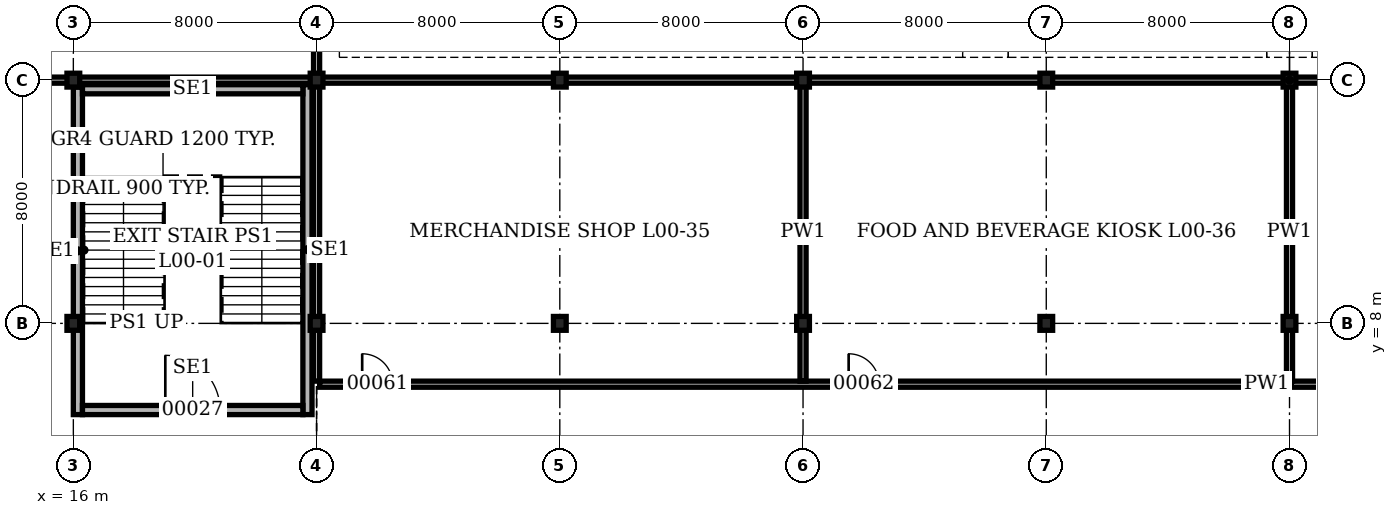
"""IFC4 building model, lengths in metres.
Left out: names, types, materials, properties, quantities, classifications, styles, units other than length and angle.
Written with IfcOpenShell. Run it as: python <this file> out.ifc"""

import sys

from ifc_helpers import new_model, si_unit, direction, frame, frame_2d, origin, origin_2d, place, context, subcontext, project, spatial, rectangle, i_section, extrude, element, fill, save


model = new_model("IFC4")
c1 = context("Model", 3, precision=1e-05, world=origin(), true_north=direction((0.0, 1.0)))
c2 = subcontext(c1, "Body", "Model", "MODEL_VIEW")
j1 = project(units=[si_unit("LENGTHUNIT", "METRE"), si_unit("PLANEANGLEUNIT", "RADIAN")], contexts=[c1])
p1 = place(None, origin())
s1 = spatial("IfcSite", under=j1, at=p1, CompositionType="ELEMENT")
p2 = place(p1, origin())
s2 = spatial("IfcBuilding", under=s1, at=p2, CompositionType="ELEMENT")
p3 = place(p2, origin())
s3 = spatial("IfcBuildingStorey", under=s2, at=p3, CompositionType="ELEMENT", Elevation=0.0)
for number, where, z_axis, x_axis in (
    (1, (16.0, 8.0, 0.0), (0.0, 0.0, 1.0), (1.0, 0.0, 0.0)),
    (2, (16.0, 16.0, 0.0), (0.0, 0.0, 1.0), (1.0, 0.0, 0.0)),
    (3, (24.0, 8.0, 0.0), (0.0, 0.0, 1.0), (1.0, 0.0, 0.0)),
    (4, (24.0, 16.0, 0.0), (0.0, 0.0, 1.0), (1.0, 0.0, 0.0)),
    (5, (32.0, 8.0, 0.0), (0.0, 0.0, 1.0), (1.0, 0.0, 0.0)),
    (6, (32.0, 16.0, 0.0), (0.0, 0.0, 1.0), (1.0, 0.0, 0.0)),
    (7, (40.0, 8.0, 0.0), (0.0, 0.0, 1.0), (1.0, 0.0, 0.0)),
    (8, (40.0, 16.0, 0.0), (0.0, 0.0, 1.0), (1.0, 0.0, 0.0)),
    (9, (48.0, 8.0, 0.0), (0.0, 0.0, 1.0), (1.0, 0.0, 0.0)),
    (10, (48.0, 16.0, 0.0), (0.0, 0.0, 1.0), (1.0, 0.0, 0.0)),
    (11, (56.0, 8.0, 0.0), (0.0, 0.0, 1.0), (1.0, 0.0, 0.0)),
    (12, (56.0, 16.0, 0.0), (0.0, 0.0, 1.0), (1.0, 0.0, 0.0)),
):
    element("IfcColumn", number, at=place(p3, frame(where, z_axis=z_axis, x_axis=x_axis)), inside=s3, PredefinedType="COLUMN", context=c2, shape_type="SweptSolid", body=[
        extrude(i_section(OverallWidth=0.419, OverallDepth=0.455, WebThickness=0.042, FlangeThickness=0.068, at=origin_2d()), origin(), (0.0, 0.0, 1.0), 4.9),
    ])
p4 = place(p3, frame((16.15, 5.0, 0.0), z_axis=(0.0, 0.0, 1.0), x_axis=(0.0, 1.0, 0.0)))
e13 = element("IfcWall", 13, at=p4, inside=s3, PredefinedType="SOLIDWALL", context=c2, shape_type="SweptSolid", body=[
    extrude(rectangle(XDim=10.773, YDim=0.3, at=frame_2d((5.386, 0.0))), origin(), (0.0, 0.0, 1.0), 4.7),
])
p5 = place(p3, frame((23.7, 5.0, 0.0), z_axis=(0.0, 0.0, 1.0), x_axis=(0.0, 1.0, 0.0)))
e14 = element("IfcWall", 14, at=p5, inside=s3, PredefinedType="SOLIDWALL", context=c2, shape_type="SweptSolid", body=[
    extrude(rectangle(XDim=10.85, YDim=0.3, at=frame_2d((5.425, 0.0))), origin(), (0.0, 0.0, 1.0), 4.7),
])
p6 = place(p3, frame((16.3, 5.15, 0.0), z_axis=(0.0, 0.0, 1.0), x_axis=(1.0, 0.0, 0.0)))
e15 = element("IfcWall", 15, at=p6, inside=s3, PredefinedType="SOLIDWALL", context=c2, shape_type="SweptSolid", body=[
    extrude(rectangle(XDim=7.25, YDim=0.3, at=frame_2d((3.625, 0.0))), origin(), (0.0, 0.0, 1.0), 4.7),
])
p7 = place(p6, frame((2.725, 0.0, 0.0)))
e16 = element("IfcOpeningElement", 16, at=p7, cuts=e15, PredefinedType="OPENING", context=c2, shape_type="SweptSolid", body=[
    extrude(rectangle(XDim=1.8, YDim=2.1, at=frame_2d((0.9, 1.05))), frame((0.0, 0.16, 0.0), z_axis=(0.0, -1.0, 0.0), x_axis=(1.0, 0.0, 0.0)), (0.0, 0.0, 1.0), 0.32),
])
p8 = place(p3, frame((16.3, 15.7, 0.0), z_axis=(0.0, 0.0, 1.0), x_axis=(1.0, 0.0, 0.0)))
e17 = element("IfcWall", 17, at=p8, inside=s3, PredefinedType="SOLIDWALL", context=c2, shape_type="SweptSolid", body=[
    extrude(rectangle(XDim=7.25, YDim=0.3, at=frame_2d((3.625, 0.0))), origin(), (0.0, 0.0, 1.0), 4.7),
])
p9 = place(p3, frame((24.1, 6.0, 0.0), z_axis=(0.0, 0.0, 1.0), x_axis=(1.0, 0.0, 0.0)))
e18 = element("IfcWall", 18, at=p9, inside=s3, PredefinedType="PARTITIONING", context=c2, shape_type="SweptSolid", body=[
    extrude(rectangle(XDim=63.8, YDim=0.2, at=frame_2d((31.9, 0.0))), origin(), (0.0, 0.0, 1.0), 4.7),
])
p10 = place(p9, frame((1.4, 0.0, 0.0)))
e19 = element("IfcOpeningElement", 19, at=p10, cuts=e18, PredefinedType="OPENING", context=c2, shape_type="SweptSolid", body=[
    extrude(rectangle(XDim=1.0, YDim=2.1, at=frame_2d((0.5, 1.05))), frame((0.0, 0.11, 0.0), z_axis=(0.0, -1.0, 0.0), x_axis=(1.0, 0.0, 0.0)), (0.0, 0.0, 1.0), 0.22),
])
p11 = place(p9, frame((17.4, 0.0, 0.0)))
e20 = element("IfcOpeningElement", 20, at=p11, cuts=e18, PredefinedType="OPENING", context=c2, shape_type="SweptSolid", body=[
    extrude(rectangle(XDim=1.0, YDim=2.1, at=frame_2d((0.5, 1.05))), frame((0.0, 0.11, 0.0), z_axis=(0.0, -1.0, 0.0), x_axis=(1.0, 0.0, 0.0)), (0.0, 0.0, 1.0), 0.22),
])
p12 = place(p9, frame((33.4, 0.0, 0.0)))
e21 = element("IfcOpeningElement", 21, at=p12, cuts=e18, PredefinedType="OPENING", context=c2, shape_type="SweptSolid", body=[
    extrude(rectangle(XDim=1.0, YDim=2.1, at=frame_2d((0.5, 1.05))), frame((0.0, 0.11, 0.0), z_axis=(0.0, -1.0, 0.0), x_axis=(1.0, 0.0, 0.0)), (0.0, 0.0, 1.0), 0.22),
])
p13 = place(p9, frame((49.0, 0.0, 0.0)))
e22 = element("IfcOpeningElement", 22, at=p13, cuts=e18, PredefinedType="OPENING", context=c2, shape_type="SweptSolid", body=[
    extrude(rectangle(XDim=1.8, YDim=2.4, at=frame_2d((0.9, 1.2))), frame((0.0, 0.11, 0.0), z_axis=(0.0, -1.0, 0.0), x_axis=(1.0, 0.0, 0.0)), (0.0, 0.0, 1.0), 0.22),
])
p14 = place(p3, frame((14.1, 16.0, 0.0), z_axis=(0.0, 0.0, 1.0), x_axis=(1.0, 0.0, 0.0)))
e23 = element("IfcWall", 23, at=p14, inside=s3, PredefinedType="PARTITIONING", context=c2, shape_type="SweptSolid", body=[
    extrude(rectangle(XDim=83.8, YDim=0.2, at=frame_2d((41.9, 0.0))), origin(), (0.0, 0.0, 1.0), 3.928),
])
p15 = place(p3, frame((24.0, 6.1, 0.0), z_axis=(0.0, 0.0, 1.0), x_axis=(0.0, 1.0, 0.0)))
e24 = element("IfcWall", 24, at=p15, inside=s3, PredefinedType="PARTITIONING", context=c2, shape_type="SweptSolid", body=[
    extrude(rectangle(XDim=57.8, YDim=0.2, at=frame_2d((28.9, 0.0))), origin(), (0.0, 0.0, 1.0), 3.928),
])
for number, where, z_axis, x_axis in (
    (25, (40.0, 6.1, 0.0), (0.0, 0.0, 1.0), (0.0, 1.0, 0.0)),
    (26, (56.0, 6.1, 0.0), (0.0, 0.0, 1.0), (0.0, 1.0, 0.0)),
):
    element("IfcWall", number, at=place(p3, frame(where, z_axis=z_axis, x_axis=x_axis)), inside=s3, PredefinedType="PARTITIONING", context=c2, shape_type="SweptSolid", body=[
        extrude(rectangle(XDim=9.8, YDim=0.2, at=frame_2d((4.9, 0.0))), origin(), (0.0, 0.0, 1.0), 3.928),
    ])
p16 = place(p7, origin())
e27 = element("IfcDoor", 27, at=p16, inside=s3, OperationType="DOUBLE_DOOR_SINGLE_SWING", PredefinedType="DOOR", context=c2, shape_type="SweptSolid", body=[
    extrude(rectangle(XDim=1.8, YDim=2.1, at=frame_2d((0.9, 1.05))), frame((0.0, 0.15, 0.0), z_axis=(0.0, -1.0, 0.0), x_axis=(1.0, 0.0, 0.0)), (0.0, 0.0, 1.0), 0.3),
])
fill(e16, e27)
p17 = place(p10, origin())
e28 = element("IfcDoor", 28, at=p17, inside=s3, OperationType="SINGLE_SWING_LEFT", PredefinedType="DOOR", context=c2, shape_type="SweptSolid", body=[
    extrude(rectangle(XDim=1.0, YDim=2.1, at=frame_2d((0.5, 1.05))), frame((0.0, 0.1, 0.0), z_axis=(0.0, -1.0, 0.0), x_axis=(1.0, 0.0, 0.0)), (0.0, 0.0, 1.0), 0.199),
])
fill(e19, e28)
p18 = place(p11, origin())
e29 = element("IfcDoor", 29, at=p18, inside=s3, OperationType="SINGLE_SWING_LEFT", PredefinedType="DOOR", context=c2, shape_type="SweptSolid", body=[
    extrude(rectangle(XDim=1.0, YDim=2.1, at=frame_2d((0.5, 1.05))), frame((0.0, 0.1, 0.0), z_axis=(0.0, -1.0, 0.0), x_axis=(1.0, 0.0, 0.0)), (0.0, 0.0, 1.0), 0.199),
])
fill(e20, e29)
save(model, sys.argv[1])
